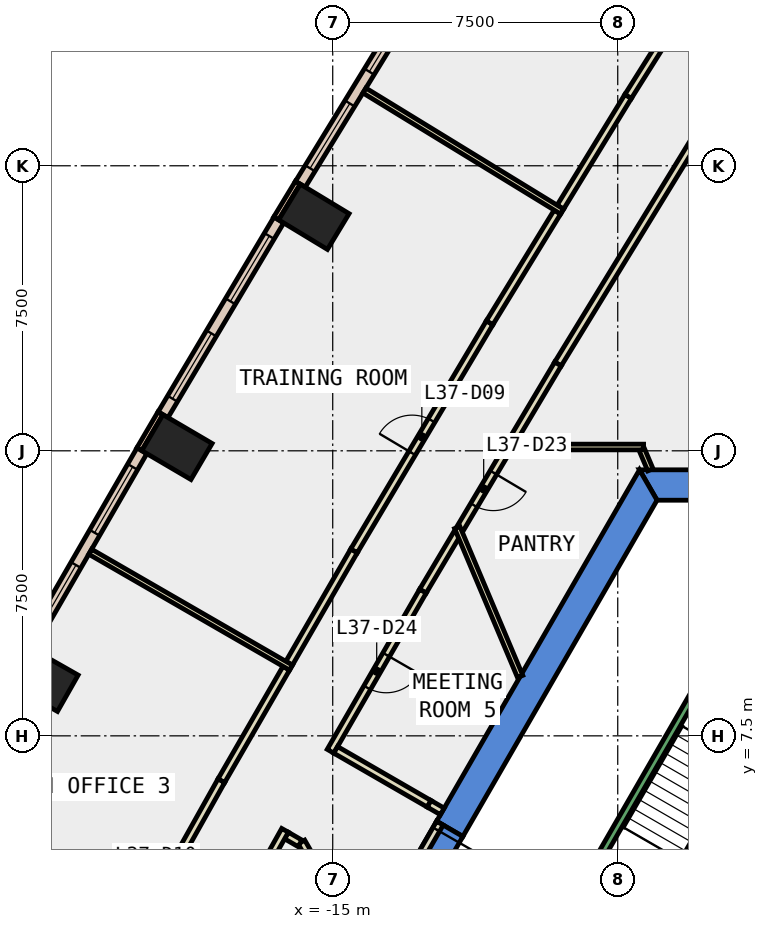
"""IFC4 building model, lengths in metres.
Left out: names, types, materials, properties, quantities, classifications, styles, units other than length and angle.
Written with IfcOpenShell. Run it as: python <this file> out.ifc"""

import sys

from ifc_helpers import new_model, si_unit, direction, frame, frame_2d, origin, origin_2d, place, context, subcontext, project, spatial, polyline, rectangle, outline, extrude, element, fill, save


model = new_model("IFC4")
c1 = context("Model", 3, precision=1e-05, world=origin(), true_north=direction((0.0, 1.0)))
c2 = subcontext(c1, "Body", "Model", "MODEL_VIEW")
j1 = project(units=[si_unit("LENGTHUNIT", "METRE"), si_unit("PLANEANGLEUNIT", "RADIAN")], contexts=[c1])
p1 = place(None, origin())
s1 = spatial("IfcSite", under=j1, at=p1, CompositionType="ELEMENT")
p2 = place(p1, origin())
s2 = spatial("IfcBuilding", under=s1, at=p2, CompositionType="ELEMENT")
p3 = place(p2, frame((0.0, 0.0, 167.6)))
s3 = spatial("IfcBuildingStorey", under=s2, at=p3, CompositionType="ELEMENT", Elevation=167.6)
for number, where, z_axis, x_axis in (
    (1, (-15.496, 21.158, -0.4), (0.0, 0.0, 1.0), (0.518, 0.855, 0.0)),
    (2, (-19.099, 15.098, -0.4), (0.0, 0.0, 1.0), (0.506, 0.863, 0.0)),
    (3, (-22.623, 8.991, -0.4), (0.0, 0.0, 1.0), (0.494, 0.869, 0.0)),
):
    element("IfcColumn", number, at=place(p3, frame(where, z_axis=z_axis, x_axis=x_axis)), inside=s3, PredefinedType="COLUMN", context=c2, shape_type="SweptSolid", body=[
        extrude(rectangle(XDim=1.1, YDim=1.5, at=origin_2d()), origin(), (0.0, 0.0, 1.0), 4.2),
    ])
p4 = place(p3, frame((0.0, 0.0, -0.4)))
e4 = element("IfcWall", 4, at=p4, inside=s3, PredefinedType="SHEAR", context=c2, shape_type="SweptSolid", body=[
    extrude(outline(polyline([(6.928, 14.5), (-6.928, 14.5), (-6.466, 13.7), (6.466, 13.7), (6.928, 14.5)])), origin(), (0.0, 0.0, 1.0), 4.2),
])
p5 = place(p3, frame((0.0, 0.0, -0.4)))
e5 = element("IfcWall", 5, at=p5, inside=s3, PredefinedType="SHEAR", context=c2, shape_type="SweptSolid", body=[
    extrude(outline(polyline([(-12.267, 5.252), (-11.575, 4.852), (-6.466, 13.7), (-6.928, 14.5), (-12.267, 5.252)])), origin(), (0.0, 0.0, 1.0), 4.2),
])
p6 = place(p3, frame((0.0, 0.0, 3.6)))
e6 = element("IfcWall", 6, at=p6, inside=s3, PredefinedType="SHEAR", context=c2, shape_type="SweptSolid", body=[
    extrude(outline(polyline([(-13.267, 3.52), (-12.575, 3.12), (-11.575, 4.852), (-12.267, 5.252), (-13.267, 3.52)])), origin(), (0.0, 0.0, 1.0), 0.2),
])
p7 = place(p3, frame((-15.917, 22.056, 0.0), z_axis=(0.0, 0.0, 1.0), x_axis=(-0.518178754102, -0.855272341888, 0.0)))
e7 = element("IfcWall", 7, at=p7, inside=s3, PredefinedType="STANDARD", context=c2, shape_type="SweptSolid", body=[
    extrude(rectangle(XDim=1.1, YDim=0.15, at=frame_2d((0.55, 0.0))), origin(), (0.0, 0.0, 1.0), 3.8),
])
p8 = place(p3, frame((-19.532, 15.989, 0.0), z_axis=(0.0, 0.0, 1.0), x_axis=(-0.50667077411, -0.862139621327, 0.0)))
e8 = element("IfcWall", 8, at=p8, inside=s3, PredefinedType="STANDARD", context=c2, shape_type="SweptSolid", body=[
    extrude(rectangle(XDim=1.1, YDim=0.15, at=frame_2d((0.55, 0.0))), origin(), (0.0, 0.0, 1.0), 3.8),
])
p9 = place(p3, frame((-12.737, 27.101, 0.0), z_axis=(0.0, 0.0, 1.0), x_axis=(-0.522156898008, -0.852849443842, 0.0)))
e9 = element("IfcWall", 9, at=p9, inside=s3, PredefinedType="STANDARD", context=c2, shape_type="SweptSolid", body=[
    extrude(rectangle(XDim=5.964, YDim=0.3, at=frame_2d((2.982, 0.0))), origin(), (0.0, 0.0, 1.0), 3.8),
])
p10 = place(p9, frame((0.491, 0.0, 0.9)))
e10 = element("IfcOpeningElement", 10, at=p10, cuts=e9, PredefinedType="OPENING", context=c2, shape_type="SweptSolid", body=[
    extrude(rectangle(XDim=2.0, YDim=2.6, at=frame_2d((1.0, 1.3))), frame((0.0, 0.16, 0.0), z_axis=(0.0, -1.0, 0.0), x_axis=(1.0, 0.0, 0.0)), (0.0, 0.0, 1.0), 0.32),
])
p11 = place(p9, frame((3.473, 0.0, 0.9)))
e11 = element("IfcOpeningElement", 11, at=p11, cuts=e9, PredefinedType="OPENING", context=c2, shape_type="SweptSolid", body=[
    extrude(rectangle(XDim=2.0, YDim=2.6, at=frame_2d((1.0, 1.3))), frame((0.0, 0.16, 0.0), z_axis=(0.0, -1.0, 0.0), x_axis=(1.0, 0.0, 0.0)), (0.0, 0.0, 1.0), 0.32),
])
p12 = place(p3, frame((-16.418, 21.074, 0.0), z_axis=(0.0, 0.0, 1.0), x_axis=(-0.511053317394, -0.8595490136, 0.0)))
e12 = element("IfcWall", 12, at=p12, inside=s3, PredefinedType="STANDARD", context=c2, shape_type="SweptSolid", body=[
    extrude(rectangle(XDim=5.962, YDim=0.3, at=frame_2d((2.981, 0.0))), origin(), (0.0, 0.0, 1.0), 3.8),
])
p13 = place(p12, frame((0.491, 0.0, 0.9)))
e13 = element("IfcOpeningElement", 13, at=p13, cuts=e12, PredefinedType="OPENING", context=c2, shape_type="SweptSolid", body=[
    extrude(rectangle(XDim=2.0, YDim=2.6, at=frame_2d((1.0, 1.3))), frame((0.0, 0.16, 0.0), z_axis=(0.0, -1.0, 0.0), x_axis=(1.0, 0.0, 0.0)), (0.0, 0.0, 1.0), 0.32),
])
p14 = place(p12, frame((3.472, 0.0, 0.9)))
e14 = element("IfcOpeningElement", 14, at=p14, cuts=e12, PredefinedType="OPENING", context=c2, shape_type="SweptSolid", body=[
    extrude(rectangle(XDim=2.0, YDim=2.6, at=frame_2d((1.0, 1.3))), frame((0.0, 0.16, 0.0), z_axis=(0.0, -1.0, 0.0), x_axis=(1.0, 0.0, 0.0)), (0.0, 0.0, 1.0), 0.32),
])
p15 = place(p3, frame((-20.02, 15.002, 0.0), z_axis=(0.0, 0.0, 1.0), x_axis=(-0.49986421087, -0.866103787482, 0.0)))
e15 = element("IfcWall", 15, at=p15, inside=s3, PredefinedType="STANDARD", context=c2, shape_type="SweptSolid", body=[
    extrude(rectangle(XDim=5.964, YDim=0.3, at=frame_2d((2.982, 0.0))), origin(), (0.0, 0.0, 1.0), 3.8),
])
p16 = place(p15, frame((0.491, 0.0, 0.9)))
e16 = element("IfcOpeningElement", 16, at=p16, cuts=e15, PredefinedType="OPENING", context=c2, shape_type="SweptSolid", body=[
    extrude(rectangle(XDim=2.0, YDim=2.6, at=frame_2d((1.0, 1.3))), frame((0.0, 0.16, 0.0), z_axis=(0.0, -1.0, 0.0), x_axis=(1.0, 0.0, 0.0)), (0.0, 0.0, 1.0), 0.32),
])
p17 = place(p15, frame((3.473, 0.0, 0.9)))
e17 = element("IfcOpeningElement", 17, at=p17, cuts=e15, PredefinedType="OPENING", context=c2, shape_type="SweptSolid", body=[
    extrude(rectangle(XDim=2.0, YDim=2.6, at=frame_2d((1.0, 1.3))), frame((0.0, 0.16, 0.0), z_axis=(0.0, -1.0, 0.0), x_axis=(1.0, 0.0, 0.0)), (0.0, 0.0, 1.0), 0.32),
])
p18 = place(p3, frame((-10.41, 15.036, 0.0), z_axis=(0.0, 0.0, 1.0), x_axis=(-0.510900085603, -0.859640100583, 0.0)))
e18 = element("IfcWall", 18, at=p18, inside=s3, PredefinedType="PARTITIONING", context=c2, shape_type="SweptSolid", body=[
    extrude(rectangle(XDim=2.419, YDim=0.2, at=frame_2d((1.21, 0.0))), origin(), (0.0, 0.0, 1.0), 3.8),
])
p19 = place(p18, frame((0.709, 0.0, 0.0)))
e19 = element("IfcOpeningElement", 19, at=p19, cuts=e18, PredefinedType="OPENING", context=c2, shape_type="SweptSolid", body=[
    extrude(rectangle(XDim=1.0, YDim=2.1, at=frame_2d((0.5, 1.05))), frame((0.0, 0.11, 0.0), z_axis=(0.0, -1.0, 0.0), x_axis=(1.0, 0.0, 0.0)), (0.0, 0.0, 1.0), 0.22),
])
p20 = place(p3, frame((-11.723, 12.827, 0.0), z_axis=(0.0, 0.0, 1.0), x_axis=(-0.511182890129, -0.859471961637, 0.0)))
e20 = element("IfcWall", 20, at=p20, inside=s3, PredefinedType="PARTITIONING", context=c2, shape_type="SweptSolid", body=[
    extrude(rectangle(XDim=1.769, YDim=0.2, at=frame_2d((0.884, 0.0))), origin(), (0.0, 0.0, 1.0), 3.8),
])
p21 = place(p3, frame((-12.627, 11.307, 0.0), z_axis=(0.0, 0.0, 1.0), x_axis=(-0.499907870494, -0.866078588246, 0.0)))
e21 = element("IfcWall", 21, at=p21, inside=s3, PredefinedType="PARTITIONING", context=c2, shape_type="SweptSolid", body=[
    extrude(rectangle(XDim=4.863, YDim=0.2, at=frame_2d((2.432, 0.0))), origin(), (0.0, 0.0, 1.0), 3.8),
])
p22 = place(p21, frame((1.932, 0.0, 0.0)))
e22 = element("IfcOpeningElement", 22, at=p22, cuts=e21, PredefinedType="OPENING", context=c2, shape_type="SweptSolid", body=[
    extrude(rectangle(XDim=1.0, YDim=2.1, at=frame_2d((0.5, 1.05))), frame((0.0, 0.11, 0.0), z_axis=(0.0, -1.0, 0.0), x_axis=(1.0, 0.0, 0.0)), (0.0, 0.0, 1.0), 0.22),
])
p23 = place(p3, frame((-14.922, 7.131, 0.0), z_axis=(0.0, 0.0, 1.0), x_axis=(0.866124025492, -0.499829143273, 0.0)))
e23 = element("IfcWall", 23, at=p23, inside=s3, PredefinedType="PARTITIONING", context=c2, shape_type="SweptSolid", body=[
    extrude(rectangle(XDim=2.839, YDim=0.2, at=frame_2d((1.42, 0.0))), origin(), (0.0, 0.0, 1.0), 3.8),
])
p24 = place(p3, frame((-5.441, 23.218, 0.0), z_axis=(0.0, 0.0, 1.0), x_axis=(-0.522108536257, -0.85287905143, 0.0)))
e24 = element("IfcWall", 24, at=p24, inside=s3, PredefinedType="PARTITIONING", context=c2, shape_type="SweptSolid", body=[
    extrude(rectangle(XDim=6.957, YDim=0.2, at=frame_2d((3.478, 0.0))), origin(), (0.0, 0.0, 1.0), 3.8),
])
p25 = place(p3, frame((-9.073, 17.285, 0.0), z_axis=(0.0, 0.0, 1.0), x_axis=(-0.51105761127, -0.859546460619, 0.0)))
e25 = element("IfcWall", 25, at=p25, inside=s3, PredefinedType="PARTITIONING", context=c2, shape_type="SweptSolid", body=[
    extrude(rectangle(XDim=2.467, YDim=0.2, at=frame_2d((1.234, 0.0))), origin(), (0.0, 0.0, 1.0), 3.8),
])
p26 = place(p3, frame((-14.154, 1.815, 0.0), z_axis=(0.0, 0.0, 1.0), x_axis=(-0.500038857296, 0.866002968352, 0.0)))
e26 = element("IfcWall", 26, at=p26, inside=s3, PredefinedType="PARTITIONING", context=c2, shape_type="SweptSolid", body=[
    extrude(rectangle(XDim=3.34, YDim=0.2, at=frame_2d((1.67, 0.0))), origin(), (0.0, 0.0, 1.0), 3.8),
])
p27 = place(p3, frame((-15.86, 4.671, 0.0), z_axis=(0.0, 0.0, 1.0), x_axis=(-0.866047486323, 0.49996174997, 0.0)))
e27 = element("IfcWall", 27, at=p27, inside=s3, PredefinedType="PARTITIONING", context=c2, shape_type="SweptSolid", body=[
    extrude(rectangle(XDim=0.412, YDim=0.2, at=frame_2d((0.206, 0.0))), origin(), (0.0, 0.0, 1.0), 3.8),
])
p28 = place(p3, frame((-16.255, 5.014, 0.0), z_axis=(0.0, 0.0, 1.0), x_axis=(-0.488988017817, -0.87229050117, 0.0)))
e28 = element("IfcWall", 28, at=p28, inside=s3, PredefinedType="PARTITIONING", context=c2, shape_type="SweptSolid", body=[
    extrude(rectangle(XDim=4.599, YDim=0.2, at=frame_2d((2.3, 0.0))), origin(), (0.0, 0.0, 1.0), 3.8),
])
p29 = place(p28, frame((1.8, 0.0, 0.0)))
e29 = element("IfcOpeningElement", 29, at=p29, cuts=e28, PredefinedType="OPENING", context=c2, shape_type="SweptSolid", body=[
    extrude(rectangle(XDim=1.0, YDim=2.1, at=frame_2d((0.5, 1.05))), frame((0.0, 0.11, 0.0), z_axis=(0.0, -1.0, 0.0), x_axis=(1.0, 0.0, 0.0)), (0.0, 0.0, 1.0), 0.22),
])
p30 = place(p3, frame((-9.01, 21.411, 0.0), z_axis=(0.0, 0.0, 1.0), x_axis=(0.52198736623, 0.852953216476, 0.0)))
e30 = element("IfcWall", 30, at=p30, inside=s3, PredefinedType="PARTITIONING", context=c2, shape_type="SweptSolid", body=[
    extrude(rectangle(XDim=3.417, YDim=0.2, at=frame_2d((1.709, 0.0))), origin(), (0.0, 0.0, 1.0), 3.8),
])
p31 = place(p3, frame((-7.226, 24.326, 0.0), z_axis=(0.0, 0.0, 1.0), x_axis=(0.532874279134, 0.846194423662, 0.0)))
e31 = element("IfcWall", 31, at=p31, inside=s3, PredefinedType="PARTITIONING", context=c2, shape_type="SweptSolid", body=[
    extrude(rectangle(XDim=6.686, YDim=0.2, at=frame_2d((3.343, 0.0))), origin(), (0.0, 0.0, 1.0), 3.8),
])
p32 = place(p31, frame((2.843, 0.0, 0.0)))
e32 = element("IfcOpeningElement", 32, at=p32, cuts=e31, PredefinedType="OPENING", context=c2, shape_type="SweptSolid", body=[
    extrude(rectangle(XDim=1.0, YDim=2.1, at=frame_2d((0.5, 1.05))), frame((0.0, 0.11, 0.0), z_axis=(0.0, -1.0, 0.0), x_axis=(1.0, 0.0, 0.0)), (0.0, 0.0, 1.0), 0.22),
])
p33 = place(p3, frame((-16.147, 9.41, 0.0), z_axis=(0.0, 0.0, 1.0), x_axis=(0.500044178772, 0.865999895656, 0.0)))
e33 = element("IfcWall", 33, at=p33, inside=s3, PredefinedType="PARTITIONING", context=c2, shape_type="SweptSolid", body=[
    extrude(rectangle(XDim=3.416, YDim=0.2, at=frame_2d((1.708, 0.0))), origin(), (0.0, 0.0, 1.0), 3.8),
])
p34 = place(p3, frame((-14.439, 12.368, 0.0), z_axis=(0.0, 0.0, 1.0), x_axis=(0.51096926939, 0.859598979606, 0.0)))
e34 = element("IfcWall", 34, at=p34, inside=s3, PredefinedType="PARTITIONING", context=c2, shape_type="SweptSolid", body=[
    extrude(rectangle(XDim=6.983, YDim=0.2, at=frame_2d((3.491, 0.0))), origin(), (0.0, 0.0, 1.0), 3.8),
])
p35 = place(p34, frame((2.991, 0.0, 0.0)))
e35 = element("IfcOpeningElement", 35, at=p35, cuts=e34, PredefinedType="OPENING", context=c2, shape_type="SweptSolid", body=[
    extrude(rectangle(XDim=1.0, YDim=2.1, at=frame_2d((0.5, 1.05))), frame((0.0, 0.11, 0.0), z_axis=(0.0, -1.0, 0.0), x_axis=(1.0, 0.0, 0.0)), (0.0, 0.0, 1.0), 0.22),
])
p36 = place(p3, frame((-10.871, 18.37, 0.0), z_axis=(0.0, 0.0, 1.0), x_axis=(0.522117781608, 0.852873391617, 0.0)))
e36 = element("IfcWall", 36, at=p36, inside=s3, PredefinedType="PARTITIONING", context=c2, shape_type="SweptSolid", body=[
    extrude(rectangle(XDim=3.415, YDim=0.2, at=frame_2d((1.708, 0.0))), origin(), (0.0, 0.0, 1.0), 3.8),
])
p37 = place(p3, frame((-21.381, 0.165, 0.0), z_axis=(0.0, 0.0, 1.0), x_axis=(0.489014139272, 0.872275857509, 0.0)))
e37 = element("IfcWall", 37, at=p37, inside=s3, PredefinedType="PARTITIONING", context=c2, shape_type="SweptSolid", body=[
    extrude(rectangle(XDim=7.057, YDim=0.2, at=frame_2d((3.529, 0.0))), origin(), (0.0, 0.0, 1.0), 3.8),
])
p38 = place(p37, frame((3.029, 0.0, 0.0)))
e38 = element("IfcOpeningElement", 38, at=p38, cuts=e37, PredefinedType="OPENING", context=c2, shape_type="SweptSolid", body=[
    extrude(rectangle(XDim=1.0, YDim=2.1, at=frame_2d((0.5, 1.05))), frame((0.0, 0.11, 0.0), z_axis=(0.0, -1.0, 0.0), x_axis=(1.0, 0.0, 0.0)), (0.0, 0.0, 1.0), 0.22),
])
p39 = place(p3, frame((-17.93, 6.321, 0.0), z_axis=(0.0, 0.0, 1.0), x_axis=(0.499920397431, 0.866071357471, 0.0)))
e39 = element("IfcWall", 39, at=p39, inside=s3, PredefinedType="PARTITIONING", context=c2, shape_type="SweptSolid", body=[
    extrude(rectangle(XDim=3.417, YDim=0.2, at=frame_2d((1.708, 0.0))), origin(), (0.0, 0.0, 1.0), 3.8),
])
p40 = place(p3, frame((-10.068, 9.062, 0.0), z_axis=(0.0, 0.0, 1.0), x_axis=(-0.388992587102, 0.921240884448, 0.0)))
e40 = element("IfcWall", 40, at=p40, inside=s3, PredefinedType="PARTITIONING", context=c2, shape_type="SweptSolid", body=[
    extrude(rectangle(XDim=4.257, YDim=0.15, at=frame_2d((2.128, 0.0))), origin(), (0.0, 0.0, 1.0), 3.8),
])
p41 = place(p3, frame((-6.82, 15.1, 0.0), z_axis=(0.0, 0.0, 1.0), x_axis=(-1.0, 0.0, 0.0)))
e41 = element("IfcWall", 41, at=p41, inside=s3, PredefinedType="PARTITIONING", context=c2, shape_type="SweptSolid", body=[
    extrude(rectangle(XDim=3.652, YDim=0.15, at=frame_2d((1.826, 0.0))), origin(), (0.0, 0.0, 1.0), 3.8),
])
p42 = place(p3, frame((-6.641, 14.5, 0.0), z_axis=(0.0, 0.0, 1.0), x_axis=(-0.389930013825, 0.920844495188, 0.0)))
e42 = element("IfcWall", 42, at=p42, inside=s3, PredefinedType="PARTITIONING", context=c2, shape_type="SweptSolid", body=[
    extrude(rectangle(XDim=0.577, YDim=0.15, at=frame_2d((0.288, 0.0))), origin(), (0.0, 0.0, 1.0), 3.8),
])
p43 = place(p3, frame((-8.964, 21.295, 0.0), z_axis=(0.0, 0.0, 1.0), x_axis=(-0.852835298101, 0.522180001832, 0.0)))
e43 = element("IfcWall", 43, at=p43, inside=s3, PredefinedType="PARTITIONING", context=c2, shape_type="SweptSolid", body=[
    extrude(rectangle(XDim=6.1, YDim=0.15, at=frame_2d((3.05, 0.0))), origin(), (0.0, 0.0, 1.0), 3.8),
])
p44 = place(p3, frame((-16.098, 9.295, 0.0), z_axis=(0.0, 0.0, 1.0), x_axis=(-0.866109615698, 0.499854112313, 0.0)))
e44 = element("IfcWall", 44, at=p44, inside=s3, PredefinedType="PARTITIONING", context=c2, shape_type="SweptSolid", body=[
    extrude(rectangle(XDim=6.1, YDim=0.15, at=frame_2d((3.05, 0.0))), origin(), (0.0, 0.0, 1.0), 3.8),
])
p45 = place(p3, frame((-12.18, 5.202, 0.0), z_axis=(0.0, 0.0, 1.0), x_axis=(-0.50002537861, -0.866010750942, 0.0)))
e45 = element("IfcWall", 45, at=p45, inside=s3, PredefinedType="PARTITIONING", context=c2, shape_type="SweptSolid", body=[
    extrude(rectangle(XDim=2.0, YDim=0.2, at=frame_2d((1.0, 0.0))), origin(), (0.0, 0.0, 1.0), 2.4),
])
p46 = place(p45, frame((0.19, 0.0, 0.0)))
e46 = element("IfcOpeningElement", 46, at=p46, cuts=e45, PredefinedType="OPENING", context=c2, shape_type="SweptSolid", body=[
    extrude(rectangle(XDim=1.8, YDim=2.1, at=frame_2d((0.9, 1.05))), frame((0.0, 0.11, 0.0), z_axis=(0.0, -1.0, 0.0), x_axis=(1.0, 0.0, 0.0)), (0.0, 0.0, 1.0), 0.22),
])
p47 = place(p3, frame((-12.463, 5.712, 0.0), z_axis=(0.0, 0.0, 1.0), x_axis=(0.865788603161, -0.500409926597, 0.0)))
e47 = element("IfcWall", 47, at=p47, inside=s3, PredefinedType="PARTITIONING", context=c2, shape_type="SweptSolid", body=[
    extrude(rectangle(XDim=0.4, YDim=0.2, at=frame_2d((0.2, 0.0))), origin(), (0.0, 0.0, 1.0), 2.4),
])
p48 = place(p3, frame((-5.03, 9.388, 0.0), z_axis=(0.0, 0.0, 1.0), x_axis=(-0.499978703459, -0.866037698999, 0.0)))
e48 = element("IfcWall", 48, at=p48, inside=s3, PredefinedType="STANDARD", context=c2, shape_type="SweptSolid", body=[
    extrude(rectangle(XDim=6.9, YDim=0.2, at=frame_2d((3.45, 0.0))), origin(), (0.0, 0.0, 1.0), 3.8),
])
p49 = place(p10, origin())
e49 = element("IfcWindow", 49, at=p49, inside=s3, PartitioningType="SINGLE_PANEL", PredefinedType="WINDOW", context=c2, shape_type="SweptSolid", body=[
    extrude(rectangle(XDim=2.0, YDim=2.6, at=frame_2d((1.0, 1.3))), frame((0.0, 0.03, 0.0), z_axis=(0.0, -1.0, 0.0), x_axis=(1.0, 0.0, 0.0)), (0.0, 0.0, 1.0), 0.06),
])
fill(e10, e49)
p50 = place(p11, origin())
e50 = element("IfcWindow", 50, at=p50, inside=s3, PartitioningType="SINGLE_PANEL", PredefinedType="WINDOW", context=c2, shape_type="SweptSolid", body=[
    extrude(rectangle(XDim=2.0, YDim=2.6, at=frame_2d((1.0, 1.3))), frame((0.0, 0.03, 0.0), z_axis=(0.0, -1.0, 0.0), x_axis=(1.0, 0.0, 0.0)), (0.0, 0.0, 1.0), 0.06),
])
fill(e11, e50)
p51 = place(p13, origin())
e51 = element("IfcWindow", 51, at=p51, inside=s3, PartitioningType="SINGLE_PANEL", PredefinedType="WINDOW", context=c2, shape_type="SweptSolid", body=[
    extrude(rectangle(XDim=2.0, YDim=2.6, at=frame_2d((1.0, 1.3))), frame((0.0, 0.03, 0.0), z_axis=(0.0, -1.0, 0.0), x_axis=(1.0, 0.0, 0.0)), (0.0, 0.0, 1.0), 0.06),
])
fill(e13, e51)
p52 = place(p14, origin())
e52 = element("IfcWindow", 52, at=p52, inside=s3, PartitioningType="SINGLE_PANEL", PredefinedType="WINDOW", context=c2, shape_type="SweptSolid", body=[
    extrude(rectangle(XDim=2.0, YDim=2.6, at=frame_2d((1.0, 1.3))), frame((0.0, 0.03, 0.0), z_axis=(0.0, -1.0, 0.0), x_axis=(1.0, 0.0, 0.0)), (0.0, 0.0, 1.0), 0.06),
])
fill(e14, e52)
p53 = place(p16, origin())
e53 = element("IfcWindow", 53, at=p53, inside=s3, PartitioningType="SINGLE_PANEL", PredefinedType="WINDOW", context=c2, shape_type="SweptSolid", body=[
    extrude(rectangle(XDim=2.0, YDim=2.6, at=frame_2d((1.0, 1.3))), frame((0.0, 0.03, 0.0), z_axis=(0.0, -1.0, 0.0), x_axis=(1.0, 0.0, 0.0)), (0.0, 0.0, 1.0), 0.06),
])
fill(e16, e53)
p54 = place(p17, origin())
e54 = element("IfcWindow", 54, at=p54, inside=s3, PartitioningType="SINGLE_PANEL", PredefinedType="WINDOW", context=c2, shape_type="SweptSolid", body=[
    extrude(rectangle(XDim=2.0, YDim=2.6, at=frame_2d((1.0, 1.3))), frame((0.0, 0.03, 0.0), z_axis=(0.0, -1.0, 0.0), x_axis=(1.0, 0.0, 0.0)), (0.0, 0.0, 1.0), 0.06),
])
fill(e17, e54)
p55 = place(p35, origin())
e55 = element("IfcDoor", 55, at=p55, inside=s3, OperationType="SINGLE_SWING_LEFT", PredefinedType="DOOR", context=c2, shape_type="SweptSolid", body=[
    extrude(rectangle(XDim=1.0, YDim=2.1, at=frame_2d((0.5, 1.05))), frame((0.0, 0.025, 0.0), z_axis=(0.0, -1.0, 0.0), x_axis=(1.0, 0.0, 0.0)), (0.0, 0.0, 1.0), 0.05),
])
fill(e35, e55)
p56 = place(p19, origin())
e56 = element("IfcDoor", 56, at=p56, inside=s3, OperationType="SINGLE_SWING_LEFT", PredefinedType="DOOR", context=c2, shape_type="SweptSolid", body=[
    extrude(rectangle(XDim=1.0, YDim=2.1, at=frame_2d((0.5, 1.05))), frame((0.0, 0.025, 0.0), z_axis=(0.0, -1.0, 0.0), x_axis=(1.0, 0.0, 0.0)), (0.0, 0.0, 1.0), 0.05),
])
fill(e19, e56)
p57 = place(p22, origin())
e57 = element("IfcDoor", 57, at=p57, inside=s3, OperationType="SINGLE_SWING_LEFT", PredefinedType="DOOR", context=c2, shape_type="SweptSolid", body=[
    extrude(rectangle(XDim=1.0, YDim=2.1, at=frame_2d((0.5, 1.05))), frame((0.0, 0.025, 0.0), z_axis=(0.0, -1.0, 0.0), x_axis=(1.0, 0.0, 0.0)), (0.0, 0.0, 1.0), 0.05),
])
fill(e22, e57)
p58 = place(p46, origin())
e58 = element("IfcDoor", 58, at=p58, inside=s3, OperationType="DOUBLE_DOOR_SINGLE_SWING", PredefinedType="DOOR", context=c2, shape_type="SweptSolid", body=[
    extrude(rectangle(XDim=1.8, YDim=2.1, at=frame_2d((0.9, 1.05))), frame((0.0, 0.025, 0.0), z_axis=(0.0, -1.0, 0.0), x_axis=(1.0, 0.0, 0.0)), (0.0, 0.0, 1.0), 0.05),
])
fill(e46, e58)
save(model, sys.argv[1])
